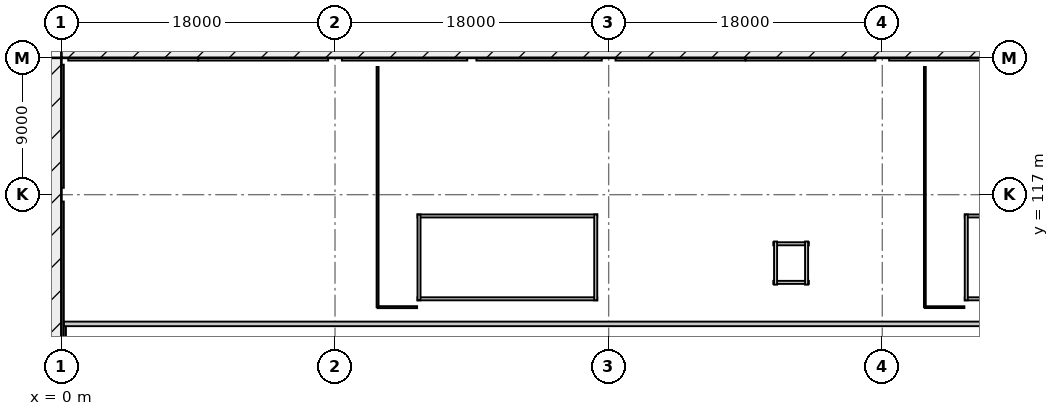
"""IFC4 building model, lengths in metres.
Left out: names, types, materials, properties, quantities, classifications, styles, units other than length and angle.
Written with IfcOpenShell. Run it as: python <this file> out.ifc"""

import sys

from ifc_helpers import new_model, si_unit, direction, frame, frame_2d, origin, origin_2d, place, context, subcontext, project, spatial, rectangle, i_section, extrude, element, fill, save


model = new_model("IFC4")
c1 = context("Model", 3, precision=1e-05, world=origin(), true_north=direction((0.0, 1.0)))
c2 = subcontext(c1, "Body", "Model", "MODEL_VIEW")
j1 = project(units=[si_unit("LENGTHUNIT", "METRE"), si_unit("PLANEANGLEUNIT", "RADIAN")], contexts=[c1])
p1 = place(None, origin())
s1 = spatial("IfcSite", under=j1, at=p1, CompositionType="ELEMENT")
p2 = place(p1, origin())
s2 = spatial("IfcBuilding", under=s1, at=p2, CompositionType="ELEMENT")
p3 = place(p2, origin())
s3 = spatial("IfcBuildingStorey", under=s2, at=p3, CompositionType="ELEMENT", Elevation=0.0)
for number, where, z_axis, x_axis in (
    (1, (0.0, 117.0, 0.0), (0.0, 0.0, 1.0), (1.0, 0.0, 0.0)),
    (2, (0.0, 126.0, 0.0), (0.0, 0.0, 1.0), (1.0, 0.0, 0.0)),
    (3, (18.0, 117.0, 0.0), (0.0, 0.0, 1.0), (1.0, 0.0, 0.0)),
    (4, (18.0, 126.0, 0.0), (0.0, 0.0, 1.0), (1.0, 0.0, 0.0)),
    (5, (36.0, 117.0, 0.0), (0.0, 0.0, 1.0), (1.0, 0.0, 0.0)),
    (6, (36.0, 126.0, 0.0), (0.0, 0.0, 1.0), (1.0, 0.0, 0.0)),
    (7, (54.0, 117.0, 0.0), (0.0, 0.0, 1.0), (1.0, 0.0, 0.0)),
    (8, (54.0, 126.0, 0.0), (0.0, 0.0, 1.0), (1.0, 0.0, 0.0)),
):
    element("IfcColumn", number, at=place(p3, frame(where, z_axis=z_axis, x_axis=x_axis)), inside=s3, PredefinedType="COLUMN", context=c2, shape_type="SweptSolid", body=[
        extrude(rectangle(XDim=0.9, YDim=0.9, at=origin_2d()), origin(), (0.0, 0.0, 1.0), 6.6),
    ])
p4 = place(p3, frame((9.0, 126.0, 0.0), z_axis=(0.0, 0.0, 1.0), x_axis=(1.0, 0.0, 0.0)))
e9 = element("IfcColumn", 9, at=p4, inside=s3, PredefinedType="PILASTER", context=c2, shape_type="SweptSolid", body=[
    extrude(i_section(OverallWidth=0.2, OverallDepth=0.2, WebThickness=0.008, FlangeThickness=0.012, FilletRadius=0.013, at=origin_2d()), origin(), (0.0, 0.0, 1.0), 6.28),
])
p5 = place(p3, frame((27.0, 126.0, 0.0), z_axis=(0.0, 0.0, 1.0), x_axis=(1.0, 0.0, 0.0)))
e10 = element("IfcColumn", 10, at=p5, inside=s3, PredefinedType="PILASTER", context=c2, shape_type="SweptSolid", body=[
    extrude(rectangle(XDim=0.6, YDim=0.4, at=origin_2d()), origin(), (0.0, 0.0, 1.0), 6.28),
])
p6 = place(p3, frame((45.0, 126.0, 0.0), z_axis=(0.0, 0.0, 1.0), x_axis=(1.0, 0.0, 0.0)))
e11 = element("IfcColumn", 11, at=p6, inside=s3, PredefinedType="PILASTER", context=c2, shape_type="SweptSolid", body=[
    extrude(i_section(OverallWidth=0.25, OverallDepth=0.25, WebThickness=0.009, FlangeThickness=0.014, FilletRadius=0.016, at=origin_2d()), origin(), (0.0, 0.0, 1.0), 6.28),
])
p7 = place(p3, frame((0.15, 104.5, -1.25), z_axis=(0.0, 0.0, 1.0), x_axis=(0.0, 1.0, 0.0)))
e12 = element("IfcWall", 12, at=p7, inside=s3, PredefinedType="SOLIDWALL", context=c2, shape_type="SweptSolid", body=[
    extrude(rectangle(XDim=4.0, YDim=0.3, at=frame_2d((2.0, 0.0))), origin(), (0.0, 0.0, 1.0), 1.23),
])
p8 = place(p3, frame((0.15, 108.5, -1.25), z_axis=(0.0, 0.0, 1.0), x_axis=(1.0, 0.0, 0.0)))
e13 = element("IfcWall", 13, at=p8, inside=s3, PredefinedType="SOLIDWALL", context=c2, shape_type="SweptSolid", body=[
    extrude(rectangle(XDim=107.7, YDim=0.3, at=frame_2d((53.85, 0.0))), origin(), (0.0, 0.0, 1.0), 0.87),
])
p9 = place(p3, frame((0.0, 104.1, 0.0), z_axis=(0.0, 0.0, 1.0), x_axis=(0.0, 1.0, 0.0)))
e14 = element("IfcWall", 14, at=p9, inside=s3, PredefinedType="SOLIDWALL", context=c2, shape_type="SweptSolid", body=[
    extrude(rectangle(XDim=12.45, YDim=0.32, at=frame_2d((6.225, 0.0))), origin(), (0.0, 0.0, 1.0), 5.495),
])
p10 = place(p9, frame((3.0, 0.0, 0.95)))
e15 = element("IfcOpeningElement", 15, at=p10, cuts=e14, PredefinedType="OPENING", context=c2, shape_type="SweptSolid", body=[
    extrude(rectangle(XDim=2.4, YDim=2.1, at=frame_2d((1.2, 1.05))), frame((0.0, 0.17, 0.0), z_axis=(0.0, -1.0, 0.0), x_axis=(1.0, 0.0, 0.0)), (0.0, 0.0, 1.0), 0.34),
])
p11 = place(p9, frame((7.15, 0.0, 0.95)))
e16 = element("IfcOpeningElement", 16, at=p11, cuts=e14, PredefinedType="OPENING", context=c2, shape_type="SweptSolid", body=[
    extrude(rectangle(XDim=2.1, YDim=2.0, at=frame_2d((1.05, 1.0))), frame((0.0, 0.17, 0.0), z_axis=(0.0, -1.0, 0.0), x_axis=(1.0, 0.0, 0.0)), (0.0, 0.0, 1.0), 0.34),
])
p12 = place(p3, frame((0.0, 117.45, 0.0), z_axis=(0.0, 0.0, 1.0), x_axis=(0.0, 1.0, 0.0)))
e17 = element("IfcWall", 17, at=p12, inside=s3, PredefinedType="SOLIDWALL", context=c2, shape_type="SweptSolid", body=[
    extrude(rectangle(XDim=8.1, YDim=0.32, at=frame_2d((4.05, 0.0))), origin(), (0.0, 0.0, 1.0), 5.67),
])
p13 = place(p12, frame((3.15, 0.0, 0.95)))
e18 = element("IfcOpeningElement", 18, at=p13, cuts=e17, PredefinedType="OPENING", context=c2, shape_type="SweptSolid", body=[
    extrude(rectangle(XDim=1.8, YDim=2.0, at=frame_2d((0.9, 1.0))), frame((0.0, 0.17, 0.0), z_axis=(0.0, -1.0, 0.0), x_axis=(1.0, 0.0, 0.0)), (0.0, 0.0, 1.0), 0.34),
])
p14 = place(p3, frame((0.45, 126.0, 0.0), z_axis=(0.0, 0.0, 1.0), x_axis=(1.0, 0.0, 0.0)))
e19 = element("IfcWall", 19, at=p14, inside=s3, PredefinedType="SOLIDWALL", context=c2, shape_type="SweptSolid", body=[
    extrude(rectangle(XDim=8.546, YDim=0.36, at=frame_2d((4.273, 0.0))), origin(), (0.0, 0.0, 1.0), 5.79),
])
p15 = place(p14, frame((2.9, 0.0, 0.0)))
e20 = element("IfcOpeningElement", 20, at=p15, cuts=e19, PredefinedType="OPENING", context=c2, shape_type="SweptSolid", body=[
    extrude(rectangle(XDim=2.4, YDim=2.5, at=frame_2d((1.2, 1.25))), frame((0.0, 0.19, 0.0), z_axis=(0.0, -1.0, 0.0), x_axis=(1.0, 0.0, 0.0)), (0.0, 0.0, 1.0), 0.38),
])
p16 = place(p3, frame((9.004, 126.0, 0.0), z_axis=(0.0, 0.0, 1.0), x_axis=(1.0, 0.0, 0.0)))
e21 = element("IfcWall", 21, at=p16, inside=s3, PredefinedType="SOLIDWALL", context=c2, shape_type="SweptSolid", body=[
    extrude(rectangle(XDim=8.546, YDim=0.36, at=frame_2d((4.273, 0.0))), origin(), (0.0, 0.0, 1.0), 5.79),
])
p17 = place(p16, frame((3.646, 0.0, 0.95)))
e22 = element("IfcOpeningElement", 22, at=p17, cuts=e21, PredefinedType="OPENING", context=c2, shape_type="SweptSolid", body=[
    extrude(rectangle(XDim=1.6, YDim=1.9, at=frame_2d((0.8, 0.95))), frame((0.0, 0.19, 0.0), z_axis=(0.0, -1.0, 0.0), x_axis=(1.0, 0.0, 0.0)), (0.0, 0.0, 1.0), 0.38),
])
p18 = place(p3, frame((18.45, 126.0, 0.0), z_axis=(0.0, 0.0, 1.0), x_axis=(1.0, 0.0, 0.0)))
e23 = element("IfcWall", 23, at=p18, inside=s3, PredefinedType="SOLIDWALL", context=c2, shape_type="SweptSolid", body=[
    extrude(rectangle(XDim=8.25, YDim=0.36, at=frame_2d((4.125, 0.0))), origin(), (0.0, 0.0, 1.0), 5.79),
])
p19 = place(p18, frame((2.9, 0.0, 0.0)))
e24 = element("IfcOpeningElement", 24, at=p19, cuts=e23, PredefinedType="OPENING", context=c2, shape_type="SweptSolid", body=[
    extrude(rectangle(XDim=2.4, YDim=2.5, at=frame_2d((1.2, 1.25))), frame((0.0, 0.19, 0.0), z_axis=(0.0, -1.0, 0.0), x_axis=(1.0, 0.0, 0.0)), (0.0, 0.0, 1.0), 0.38),
])
p20 = place(p3, frame((27.3, 126.0, 0.0), z_axis=(0.0, 0.0, 1.0), x_axis=(1.0, 0.0, 0.0)))
e25 = element("IfcWall", 25, at=p20, inside=s3, PredefinedType="SOLIDWALL", context=c2, shape_type="SweptSolid", body=[
    extrude(rectangle(XDim=8.25, YDim=0.36, at=frame_2d((4.125, 0.0))), origin(), (0.0, 0.0, 1.0), 5.79),
])
p21 = place(p20, frame((2.65, 0.0, 0.95)))
e26 = element("IfcOpeningElement", 26, at=p21, cuts=e25, PredefinedType="OPENING", context=c2, shape_type="SweptSolid", body=[
    extrude(rectangle(XDim=3.0, YDim=2.1, at=frame_2d((1.5, 1.05))), frame((0.0, 0.19, 0.0), z_axis=(0.0, -1.0, 0.0), x_axis=(1.0, 0.0, 0.0)), (0.0, 0.0, 1.0), 0.38),
])
p22 = place(p3, frame((36.45, 126.0, 0.0), z_axis=(0.0, 0.0, 1.0), x_axis=(1.0, 0.0, 0.0)))
e27 = element("IfcWall", 27, at=p22, inside=s3, PredefinedType="SOLIDWALL", context=c2, shape_type="SweptSolid", body=[
    extrude(rectangle(XDim=8.546, YDim=0.36, at=frame_2d((4.273, 0.0))), origin(), (0.0, 0.0, 1.0), 5.79),
])
p23 = place(p22, frame((3.0, 0.0, 0.0)))
e28 = element("IfcOpeningElement", 28, at=p23, cuts=e27, PredefinedType="OPENING", context=c2, shape_type="SweptSolid", body=[
    extrude(rectangle(XDim=2.2, YDim=2.45, at=frame_2d((1.1, 1.225))), frame((0.0, 0.19, 0.0), z_axis=(0.0, -1.0, 0.0), x_axis=(1.0, 0.0, 0.0)), (0.0, 0.0, 1.0), 0.38),
])
p24 = place(p3, frame((45.004, 126.0, 0.0), z_axis=(0.0, 0.0, 1.0), x_axis=(1.0, 0.0, 0.0)))
e29 = element("IfcWall", 29, at=p24, inside=s3, PredefinedType="SOLIDWALL", context=c2, shape_type="SweptSolid", body=[
    extrude(rectangle(XDim=8.546, YDim=0.36, at=frame_2d((4.273, 0.0))), origin(), (0.0, 0.0, 1.0), 5.79),
])
p25 = place(p24, frame((3.095, 0.0, 0.95)))
e30 = element("IfcOpeningElement", 30, at=p25, cuts=e29, PredefinedType="OPENING", context=c2, shape_type="SweptSolid", body=[
    extrude(rectangle(XDim=2.7, YDim=2.1, at=frame_2d((1.35, 1.05))), frame((0.0, 0.19, 0.0), z_axis=(0.0, -1.0, 0.0), x_axis=(1.0, 0.0, 0.0)), (0.0, 0.0, 1.0), 0.38),
])
p26 = place(p3, frame((54.45, 126.0, 0.0), z_axis=(0.0, 0.0, 1.0), x_axis=(1.0, 0.0, 0.0)))
e31 = element("IfcWall", 31, at=p26, inside=s3, PredefinedType="SOLIDWALL", context=c2, shape_type="SweptSolid", body=[
    extrude(rectangle(XDim=8.25, YDim=0.36, at=frame_2d((4.125, 0.0))), origin(), (0.0, 0.0, 1.0), 5.79),
])
p27 = place(p26, frame((3.0, 0.0, 0.0)))
e32 = element("IfcOpeningElement", 32, at=p27, cuts=e31, PredefinedType="OPENING", context=c2, shape_type="SweptSolid", body=[
    extrude(rectangle(XDim=2.2, YDim=2.45, at=frame_2d((1.1, 1.225))), frame((0.0, 0.19, 0.0), z_axis=(0.0, -1.0, 0.0), x_axis=(1.0, 0.0, 0.0)), (0.0, 0.0, 1.0), 0.38),
])
for number, where, z_axis, x_axis in (
    (33, (23.425, 110.15, 0.0), (0.0, 0.0, 1.0), (1.0, 0.0, 0.0)),
    (34, (35.25, 115.6, 0.0), (0.0, 0.0, 1.0), (-1.0, 0.0, 0.0)),
):
    element("IfcWall", number, at=place(p3, frame(where, z_axis=z_axis, x_axis=x_axis)), inside=s3, PredefinedType="SOLIDWALL", context=c2, shape_type="SweptSolid", body=[
        extrude(rectangle(XDim=11.825, YDim=0.2, at=frame_2d((5.913, 0.0))), origin(), (0.0, 0.0, 1.0), 6.32),
    ])
p28 = place(p3, frame((35.15, 110.05, 0.0), z_axis=(0.0, 0.0, 1.0), x_axis=(0.0, 1.0, 0.0)))
e35 = element("IfcWall", 35, at=p28, inside=s3, PredefinedType="SOLIDWALL", context=c2, shape_type="SweptSolid", body=[
    extrude(rectangle(XDim=5.65, YDim=0.2, at=frame_2d((2.825, 0.0))), origin(), (0.0, 0.0, 1.0), 6.32),
])
p29 = place(p3, frame((23.525, 115.7, 0.0), z_axis=(0.0, 0.0, 1.0), x_axis=(0.0, -1.0, 0.0)))
e36 = element("IfcWall", 36, at=p29, inside=s3, PredefinedType="SOLIDWALL", context=c2, shape_type="SweptSolid", body=[
    extrude(rectangle(XDim=5.65, YDim=0.2, at=frame_2d((2.825, 0.0))), origin(), (0.0, 0.0, 1.0), 4.4),
])
p30 = place(p29, frame((2.025, 0.0, 0.0)))
e37 = element("IfcOpeningElement", 37, at=p30, cuts=e36, PredefinedType="OPENING", context=c2, shape_type="SweptSolid", body=[
    extrude(rectangle(XDim=1.6, YDim=2.15, at=frame_2d((0.8, 1.075))), frame((0.0, 0.11, 0.0), z_axis=(0.0, -1.0, 0.0), x_axis=(1.0, 0.0, 0.0)), (0.0, 0.0, 1.0), 0.22),
])
for number, where, z_axis, x_axis in (
    (38, (59.425, 110.15, 0.0), (0.0, 0.0, 1.0), (1.0, 0.0, 0.0)),
    (39, (71.25, 115.6, 0.0), (0.0, 0.0, 1.0), (-1.0, 0.0, 0.0)),
):
    element("IfcWall", number, at=place(p3, frame(where, z_axis=z_axis, x_axis=x_axis)), inside=s3, PredefinedType="SOLIDWALL", context=c2, shape_type="SweptSolid", body=[
        extrude(rectangle(XDim=11.825, YDim=0.2, at=frame_2d((5.913, 0.0))), origin(), (0.0, 0.0, 1.0), 6.32),
    ])
p31 = place(p3, frame((59.525, 115.7, 0.0), z_axis=(0.0, 0.0, 1.0), x_axis=(0.0, -1.0, 0.0)))
e40 = element("IfcWall", 40, at=p31, inside=s3, PredefinedType="SOLIDWALL", context=c2, shape_type="SweptSolid", body=[
    extrude(rectangle(XDim=5.65, YDim=0.2, at=frame_2d((2.825, 0.0))), origin(), (0.0, 0.0, 1.0), 4.4),
])
p32 = place(p31, frame((2.025, 0.0, 0.0)))
e41 = element("IfcOpeningElement", 41, at=p32, cuts=e40, PredefinedType="OPENING", context=c2, shape_type="SweptSolid", body=[
    extrude(rectangle(XDim=1.6, YDim=2.15, at=frame_2d((0.8, 1.075))), frame((0.0, 0.11, 0.0), z_axis=(0.0, -1.0, 0.0), x_axis=(1.0, 0.0, 0.0)), (0.0, 0.0, 1.0), 0.22),
])
p33 = place(p3, frame((46.83, 111.23, 0.0), z_axis=(0.0, 0.0, 1.0), x_axis=(1.0, 0.0, 0.0)))
e42 = element("IfcWall", 42, at=p33, inside=s3, PredefinedType="SOLIDWALL", context=c2, shape_type="SweptSolid", body=[
    extrude(rectangle(XDim=2.34, YDim=0.2, at=frame_2d((1.17, 0.0))), origin(), (0.0, 0.0, 1.0), 4.4),
])
p34 = place(p33, frame((0.62, 0.0, 0.0)))
e43 = element("IfcOpeningElement", 43, at=p34, cuts=e42, PredefinedType="OPENING", context=c2, shape_type="SweptSolid", body=[
    extrude(rectangle(XDim=1.1, YDim=2.15, at=frame_2d((0.55, 1.075))), frame((0.0, 0.11, 0.0), z_axis=(0.0, -1.0, 0.0), x_axis=(1.0, 0.0, 0.0)), (0.0, 0.0, 1.0), 0.22),
])
p35 = place(p3, frame((49.17, 113.77, 0.0), z_axis=(0.0, 0.0, 1.0), x_axis=(-1.0, 0.0, 0.0)))
e44 = element("IfcWall", 44, at=p35, inside=s3, PredefinedType="SOLIDWALL", context=c2, shape_type="SweptSolid", body=[
    extrude(rectangle(XDim=2.34, YDim=0.2, at=frame_2d((1.17, 0.0))), origin(), (0.0, 0.0, 1.0), 4.4),
])
for number, where, z_axis, x_axis in (
    (45, (46.98, 113.92, 0.0), (0.0, 0.0, 1.0), (0.0, -1.0, 0.0)),
    (46, (49.02, 111.08, 0.0), (0.0, 0.0, 1.0), (0.0, 1.0, 0.0)),
):
    element("IfcWall", number, at=place(p3, frame(where, z_axis=z_axis, x_axis=x_axis)), inside=s3, PredefinedType="SOLIDWALL", context=c2, shape_type="SweptSolid", body=[
        extrude(rectangle(XDim=2.84, YDim=0.2, at=frame_2d((1.42, 0.0))), origin(), (0.0, 0.0, 1.0), 4.4),
    ])
p36 = place(p3, frame((23.4, 109.6, 0.0), z_axis=(0.0, 0.0, 1.0), x_axis=(-1.0, 0.0, 0.0)))
e47 = element("IfcWall", 47, at=p36, inside=s3, PredefinedType="PARTITIONING", context=c2, shape_type="SweptSolid", body=[
    extrude(rectangle(XDim=2.6, YDim=0.13, at=frame_2d((1.3, 0.0))), origin(), (0.0, 0.0, 1.0), 4.4),
])
p37 = place(p3, frame((20.8, 109.6, 0.0), z_axis=(0.0, 0.0, 1.0), x_axis=(0.0, 1.0, 0.0)))
e48 = element("IfcWall", 48, at=p37, inside=s3, PredefinedType="PARTITIONING", context=c2, shape_type="SweptSolid", body=[
    extrude(rectangle(XDim=15.8, YDim=0.13, at=frame_2d((7.9, 0.0))), origin(), (0.0, 0.0, 1.0), 4.4),
])
p38 = place(p37, frame((7.15, 0.0, 0.0)))
e49 = element("IfcOpeningElement", 49, at=p38, cuts=e48, PredefinedType="OPENING", context=c2, shape_type="SweptSolid", body=[
    extrude(rectangle(XDim=1.5, YDim=2.15, at=frame_2d((0.75, 1.075))), frame((0.0, 0.075, 0.0), z_axis=(0.0, -1.0, 0.0), x_axis=(1.0, 0.0, 0.0)), (0.0, 0.0, 1.0), 0.15),
])
p39 = place(p3, frame((59.4, 109.6, 0.0), z_axis=(0.0, 0.0, 1.0), x_axis=(-1.0, 0.0, 0.0)))
e50 = element("IfcWall", 50, at=p39, inside=s3, PredefinedType="PARTITIONING", context=c2, shape_type="SweptSolid", body=[
    extrude(rectangle(XDim=2.6, YDim=0.12, at=frame_2d((1.3, 0.0))), origin(), (0.0, 0.0, 1.0), 4.4),
])
p40 = place(p3, frame((56.8, 109.6, 0.0), z_axis=(0.0, 0.0, 1.0), x_axis=(0.0, 1.0, 0.0)))
e51 = element("IfcWall", 51, at=p40, inside=s3, PredefinedType="PARTITIONING", context=c2, shape_type="SweptSolid", body=[
    extrude(rectangle(XDim=15.8, YDim=0.12, at=frame_2d((7.9, 0.0))), origin(), (0.0, 0.0, 1.0), 4.4),
])
p41 = place(p40, frame((7.15, 0.0, 0.0)))
e52 = element("IfcOpeningElement", 52, at=p41, cuts=e51, PredefinedType="OPENING", context=c2, shape_type="SweptSolid", body=[
    extrude(rectangle(XDim=1.5, YDim=2.15, at=frame_2d((0.75, 1.075))), frame((0.0, 0.07, 0.0), z_axis=(0.0, -1.0, 0.0), x_axis=(1.0, 0.0, 0.0)), (0.0, 0.0, 1.0), 0.14),
])
p42 = place(p10, origin())
e53 = element("IfcWindow", 53, at=p42, inside=s3, PartitioningType="SINGLE_PANEL", PredefinedType="WINDOW", context=c2, shape_type="SweptSolid", body=[
    extrude(rectangle(XDim=2.4, YDim=2.1, at=frame_2d((1.2, 1.05))), frame((0.0, 0.03, 0.0), z_axis=(0.0, -1.0, 0.0), x_axis=(1.0, 0.0, 0.0)), (0.0, 0.0, 1.0), 0.06),
])
fill(e15, e53)
p43 = place(p11, origin())
e54 = element("IfcWindow", 54, at=p43, inside=s3, PartitioningType="SINGLE_PANEL", PredefinedType="WINDOW", context=c2, shape_type="SweptSolid", body=[
    extrude(rectangle(XDim=2.1, YDim=2.0, at=frame_2d((1.05, 1.0))), frame((0.0, 0.03, 0.0), z_axis=(0.0, -1.0, 0.0), x_axis=(1.0, 0.0, 0.0)), (0.0, 0.0, 1.0), 0.06),
])
fill(e16, e54)
p44 = place(p13, origin())
e55 = element("IfcWindow", 55, at=p44, inside=s3, PartitioningType="SINGLE_PANEL", PredefinedType="WINDOW", context=c2, shape_type="SweptSolid", body=[
    extrude(rectangle(XDim=1.8, YDim=2.0, at=frame_2d((0.9, 1.0))), frame((0.0, 0.03, 0.0), z_axis=(0.0, -1.0, 0.0), x_axis=(1.0, 0.0, 0.0)), (0.0, 0.0, 1.0), 0.06),
])
fill(e18, e55)
p45 = place(p15, origin())
e56 = element("IfcDoor", 56, at=p45, inside=s3, OperationType="SINGLE_SWING_LEFT", PredefinedType="DOOR", context=c2, shape_type="SweptSolid", body=[
    extrude(rectangle(XDim=2.4, YDim=2.5, at=frame_2d((1.2, 1.25))), frame((0.0, 0.025, 0.0), z_axis=(0.0, -1.0, 0.0), x_axis=(1.0, 0.0, 0.0)), (0.0, 0.0, 1.0), 0.05),
])
fill(e20, e56)
p46 = place(p17, origin())
e57 = element("IfcWindow", 57, at=p46, inside=s3, PartitioningType="SINGLE_PANEL", PredefinedType="WINDOW", context=c2, shape_type="SweptSolid", body=[
    extrude(rectangle(XDim=1.6, YDim=1.9, at=frame_2d((0.8, 0.95))), frame((0.0, 0.03, 0.0), z_axis=(0.0, -1.0, 0.0), x_axis=(1.0, 0.0, 0.0)), (0.0, 0.0, 1.0), 0.06),
])
fill(e22, e57)
p47 = place(p19, origin())
e58 = element("IfcDoor", 58, at=p47, inside=s3, OperationType="SINGLE_SWING_RIGHT", PredefinedType="DOOR", context=c2, shape_type="SweptSolid", body=[
    extrude(rectangle(XDim=2.4, YDim=2.5, at=frame_2d((1.2, 1.25))), frame((0.0, 0.025, 0.0), z_axis=(0.0, -1.0, 0.0), x_axis=(1.0, 0.0, 0.0)), (0.0, 0.0, 1.0), 0.05),
])
fill(e24, e58)
p48 = place(p21, origin())
e59 = element("IfcWindow", 59, at=p48, inside=s3, PartitioningType="SINGLE_PANEL", PredefinedType="WINDOW", context=c2, shape_type="SweptSolid", body=[
    extrude(rectangle(XDim=3.0, YDim=2.1, at=frame_2d((1.5, 1.05))), frame((0.0, 0.03, 0.0), z_axis=(0.0, -1.0, 0.0), x_axis=(1.0, 0.0, 0.0)), (0.0, 0.0, 1.0), 0.06),
])
fill(e26, e59)
p49 = place(p23, origin())
e60 = element("IfcDoor", 60, at=p49, inside=s3, OperationType="SINGLE_SWING_LEFT", PredefinedType="DOOR", context=c2, shape_type="SweptSolid", body=[
    extrude(rectangle(XDim=2.2, YDim=2.45, at=frame_2d((1.1, 1.225))), frame((0.0, 0.025, 0.0), z_axis=(0.0, -1.0, 0.0), x_axis=(1.0, 0.0, 0.0)), (0.0, 0.0, 1.0), 0.05),
])
fill(e28, e60)
p50 = place(p25, origin())
e61 = element("IfcWindow", 61, at=p50, inside=s3, PartitioningType="SINGLE_PANEL", PredefinedType="WINDOW", context=c2, shape_type="SweptSolid", body=[
    extrude(rectangle(XDim=2.7, YDim=2.1, at=frame_2d((1.35, 1.05))), frame((0.0, 0.03, 0.0), z_axis=(0.0, -1.0, 0.0), x_axis=(1.0, 0.0, 0.0)), (0.0, 0.0, 1.0), 0.06),
])
fill(e30, e61)
p51 = place(p27, origin())
e62 = element("IfcDoor", 62, at=p51, inside=s3, OperationType="SINGLE_SWING_RIGHT", PredefinedType="DOOR", context=c2, shape_type="SweptSolid", body=[
    extrude(rectangle(XDim=2.2, YDim=2.45, at=frame_2d((1.1, 1.225))), frame((0.0, 0.025, 0.0), z_axis=(0.0, -1.0, 0.0), x_axis=(1.0, 0.0, 0.0)), (0.0, 0.0, 1.0), 0.05),
])
fill(e32, e62)
p52 = place(p30, origin())
e63 = element("IfcDoor", 63, at=p52, inside=s3, OperationType="SINGLE_SWING_RIGHT", PredefinedType="DOOR", context=c2, shape_type="SweptSolid", body=[
    extrude(rectangle(XDim=1.6, YDim=2.15, at=frame_2d((0.8, 1.075))), frame((0.0, 0.025, 0.0), z_axis=(0.0, -1.0, 0.0), x_axis=(1.0, 0.0, 0.0)), (0.0, 0.0, 1.0), 0.05),
])
fill(e37, e63)
p53 = place(p32, origin())
e64 = element("IfcDoor", 64, at=p53, inside=s3, OperationType="SINGLE_SWING_RIGHT", PredefinedType="DOOR", context=c2, shape_type="SweptSolid", body=[
    extrude(rectangle(XDim=1.6, YDim=2.15, at=frame_2d((0.8, 1.075))), frame((0.0, 0.025, 0.0), z_axis=(0.0, -1.0, 0.0), x_axis=(1.0, 0.0, 0.0)), (0.0, 0.0, 1.0), 0.05),
])
fill(e41, e64)
p54 = place(p34, origin())
e65 = element("IfcDoor", 65, at=p54, inside=s3, OperationType="SLIDING_TO_LEFT", PredefinedType="DOOR", context=c2, shape_type="SweptSolid", body=[
    extrude(rectangle(XDim=1.1, YDim=2.15, at=frame_2d((0.55, 1.075))), frame((0.0, 0.025, 0.0), z_axis=(0.0, -1.0, 0.0), x_axis=(1.0, 0.0, 0.0)), (0.0, 0.0, 1.0), 0.05),
])
fill(e43, e65)
p55 = place(p38, origin())
e66 = element("IfcDoor", 66, at=p55, inside=s3, OperationType="SINGLE_SWING_RIGHT", PredefinedType="DOOR", context=c2, shape_type="SweptSolid", body=[
    extrude(rectangle(XDim=1.5, YDim=2.15, at=frame_2d((0.75, 1.075))), frame((0.0, 0.025, 0.0), z_axis=(0.0, -1.0, 0.0), x_axis=(1.0, 0.0, 0.0)), (0.0, 0.0, 1.0), 0.05),
])
fill(e49, e66)
p56 = place(p41, origin())
e67 = element("IfcDoor", 67, at=p56, inside=s3, OperationType="SINGLE_SWING_LEFT", PredefinedType="DOOR", context=c2, shape_type="SweptSolid", body=[
    extrude(rectangle(XDim=1.5, YDim=2.15, at=frame_2d((0.75, 1.075))), frame((0.0, 0.025, 0.0), z_axis=(0.0, -1.0, 0.0), x_axis=(1.0, 0.0, 0.0)), (0.0, 0.0, 1.0), 0.05),
])
fill(e52, e67)
save(model, sys.argv[1])
